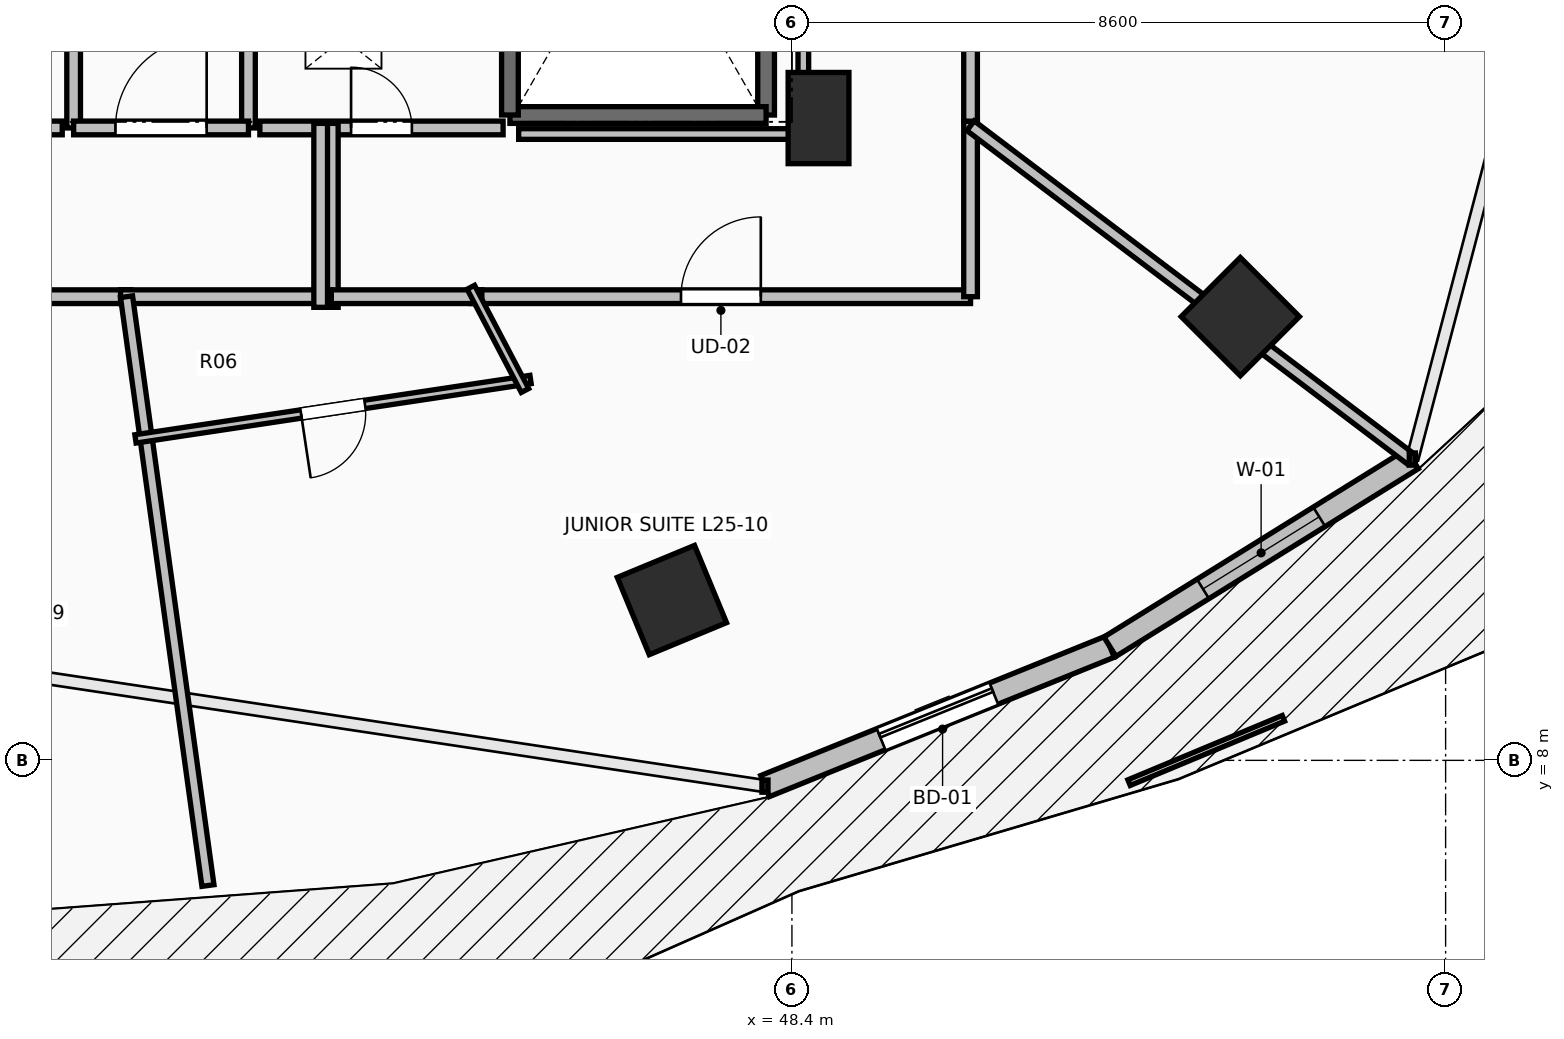
"""IFC4 building model, lengths in metres.
Left out: names, types, materials, properties, quantities, classifications, styles, units other than length and angle.
Written with IfcOpenShell. Run it as: python <this file> out.ifc"""

import sys

from ifc_helpers import new_model, si_unit, direction, frame, frame_2d, origin, origin_2d, place, context, subcontext, project, spatial, rectangle, extrude, element, fill, save


model = new_model("IFC4")
c1 = context("Model", 3, precision=1e-05, world=origin(), true_north=direction((0.0, 1.0)))
c2 = subcontext(c1, "Body", "Model", "MODEL_VIEW")
j1 = project(units=[si_unit("LENGTHUNIT", "METRE"), si_unit("PLANEANGLEUNIT", "RADIAN")], contexts=[c1])
p1 = place(None, origin())
s1 = spatial("IfcSite", under=j1, at=p1, CompositionType="ELEMENT")
p2 = place(p1, origin())
s2 = spatial("IfcBuilding", under=s1, at=p2, CompositionType="ELEMENT")
p3 = place(p2, frame((0.0, 0.0, 96.3)))
s3 = spatial("IfcBuildingStorey", under=s2, at=p3, CompositionType="ELEMENT", Elevation=96.3)
for number, where, z_axis, x_axis in (
    (1, (46.821, 10.109, 0.0), (0.0, 0.0, 1.0), (0.383, -0.924, 0.0)),
    (2, (54.299, 13.838, 0.0), (0.0, 0.0, 1.0), (0.707, -0.707, 0.0)),
):
    element("IfcColumn", number, at=place(p3, frame(where, z_axis=z_axis, x_axis=x_axis)), inside=s3, PredefinedType="COLUMN", context=c2, shape_type="SweptSolid", body=[
        extrude(rectangle(XDim=1.1, YDim=1.1, at=origin_2d()), origin(), (0.0, 0.0, 1.0), 3.5),
    ])
p4 = place(p3, frame((48.75, 16.45, 0.0), z_axis=(0.0, 0.0, 1.0), x_axis=(1.0, 0.0, 0.0)))
e3 = element("IfcColumn", 3, at=p4, inside=s3, PredefinedType="PILASTER", context=c2, shape_type="SweptSolid", body=[
    extrude(rectangle(XDim=0.8, YDim=1.2, at=origin_2d()), origin(), (0.0, 0.0, 1.0), 3.5),
])
p5 = place(p3, frame((48.045, 7.661, 0.0), z_axis=(0.0, 0.0, 1.0), x_axis=(0.927122233109, 0.374759075775, 0.0)))
e4 = element("IfcWall", 4, at=p5, inside=s3, PredefinedType="STANDARD", context=c2, shape_type="SweptSolid", body=[
    extrude(rectangle(XDim=4.895, YDim=0.3, at=frame_2d((2.448, 0.0))), origin(), (0.0, 0.0, 1.0), 3.24),
])
p6 = place(p5, frame((1.647, 0.0, 0.0)))
e5 = element("IfcOpeningElement", 5, at=p6, cuts=e4, PredefinedType="OPENING", context=c2, shape_type="SweptSolid", body=[
    extrude(rectangle(XDim=1.6, YDim=2.3, at=frame_2d((0.8, 1.15))), frame((0.0, 0.165, 0.0), z_axis=(0.0, -1.0, 0.0), x_axis=(1.0, 0.0, 0.0)), (0.0, 0.0, 1.0), 0.33),
])
p7 = place(p3, frame((52.584, 9.495, 0.0), z_axis=(0.0, 0.0, 1.0), x_axis=(0.849684479743, 0.527291461038, 0.0)))
e6 = element("IfcWall", 6, at=p7, inside=s3, PredefinedType="STANDARD", context=c2, shape_type="SweptSolid", body=[
    extrude(rectangle(XDim=4.681, YDim=0.3, at=frame_2d((2.341, 0.0))), origin(), (0.0, 0.0, 1.0), 3.24),
])
p8 = place(p7, frame((1.441, 0.0, 0.85)))
e7 = element("IfcOpeningElement", 7, at=p8, cuts=e6, PredefinedType="OPENING", context=c2, shape_type="SweptSolid", body=[
    extrude(rectangle(XDim=1.8, YDim=2.19, at=frame_2d((0.9, 1.095))), frame((0.0, 0.165, 0.0), z_axis=(0.0, -1.0, 0.0), x_axis=(1.0, 0.0, 0.0)), (0.0, 0.0, 1.0), 0.33),
])
p9 = place(p3, frame((48.06, 23.91, 0.0), z_axis=(0.0, 0.0, 1.0), x_axis=(0.0, -1.0, 0.0)))
e8 = element("IfcWall", 8, at=p9, inside=s3, PredefinedType="SOLIDWALL", context=c2, shape_type="SweptSolid", body=[
    extrude(rectangle(XDim=7.42, YDim=0.22, at=frame_2d((3.71, 0.0))), origin(), (0.0, 0.0, 1.0), 3.24),
])
p10 = place(p3, frame((48.06, 16.49, 0.0), z_axis=(0.0, 0.0, 1.0), x_axis=(-1.0, 0.0, 0.0)))
e9 = element("IfcWall", 9, at=p10, inside=s3, PredefinedType="SOLIDWALL", context=c2, shape_type="SweptSolid", body=[
    extrude(rectangle(XDim=3.37, YDim=0.22, at=frame_2d((1.685, 0.0))), origin(), (0.0, 0.0, 1.0), 3.24),
])
p11 = place(p3, frame((44.69, 16.49, 0.0), z_axis=(0.0, 0.0, 1.0), x_axis=(0.0, 1.0, 0.0)))
e10 = element("IfcWall", 10, at=p11, inside=s3, PredefinedType="SOLIDWALL", context=c2, shape_type="SweptSolid", body=[
    extrude(rectangle(XDim=7.42, YDim=0.22, at=frame_2d((3.71, 0.0))), origin(), (0.0, 0.0, 1.0), 3.24),
])
p12 = place(p3, frame((41.25, 16.32, 0.0), z_axis=(0.0, 0.0, 1.0), x_axis=(0.0, 1.0, 0.0)))
e11 = element("IfcWall", 11, at=p12, inside=s3, PredefinedType="PARTITIONING", context=c2, shape_type="SweptSolid", body=[
    extrude(rectangle(XDim=3.985, YDim=0.18, at=frame_2d((1.992, 0.0))), origin(), (0.0, 0.0, 1.0), 3.24),
])
p13 = place(p12, frame((1.593, 0.0, 0.0)))
e12 = element("IfcOpeningElement", 12, at=p13, cuts=e11, PredefinedType="OPENING", context=c2, shape_type="SweptSolid", body=[
    extrude(rectangle(XDim=0.8, YDim=2.05, at=frame_2d((0.4, 1.025))), frame((0.0, 0.105, 0.0), z_axis=(0.0, -1.0, 0.0), x_axis=(1.0, 0.0, 0.0)), (0.0, 0.0, 1.0), 0.21),
])
p14 = place(p3, frame((38.95, 21.755, 0.0), z_axis=(0.0, 0.0, 1.0), x_axis=(0.0, -1.0, 0.0)))
e13 = element("IfcWall", 13, at=p14, inside=s3, PredefinedType="PARTITIONING", context=c2, shape_type="SweptSolid", body=[
    extrude(rectangle(XDim=5.435, YDim=0.18, at=frame_2d((2.717, 0.0))), origin(), (0.0, 0.0, 1.0), 3.24),
])
p15 = place(p14, frame((2.292, 0.0, 0.0)))
e14 = element("IfcOpeningElement", 14, at=p15, cuts=e13, PredefinedType="OPENING", context=c2, shape_type="SweptSolid", body=[
    extrude(rectangle(XDim=0.85, YDim=2.1, at=frame_2d((0.425, 1.05))), frame((0.0, 0.105, 0.0), z_axis=(0.0, -1.0, 0.0), x_axis=(1.0, 0.0, 0.0)), (0.0, 0.0, 1.0), 0.21),
])
p16 = place(p3, frame((38.95, 16.32, 0.0), z_axis=(0.0, 0.0, 1.0), x_axis=(1.0, 0.0, 0.0)))
e15 = element("IfcWall", 15, at=p16, inside=s3, PredefinedType="PARTITIONING", context=c2, shape_type="SweptSolid", body=[
    extrude(rectangle(XDim=2.3, YDim=0.18, at=frame_2d((1.15, 0.0))), origin(), (0.0, 0.0, 1.0), 3.24),
])
p17 = place(p16, frame((0.55, 0.0, 0.0)))
e16 = element("IfcOpeningElement", 16, at=p17, cuts=e15, PredefinedType="OPENING", context=c2, shape_type="SweptSolid", body=[
    extrude(rectangle(XDim=1.2, YDim=2.15, at=frame_2d((0.6, 1.075))), frame((0.0, 0.105, 0.0), z_axis=(0.0, -1.0, 0.0), x_axis=(1.0, 0.0, 0.0)), (0.0, 0.0, 1.0), 0.21),
])
p18 = place(p3, frame((41.4, 16.32, 0.0), z_axis=(0.0, 0.0, 1.0), x_axis=(1.0, 0.0, 0.0)))
e17 = element("IfcWall", 17, at=p18, inside=s3, PredefinedType="PARTITIONING", context=c2, shape_type="SweptSolid", body=[
    extrude(rectangle(XDim=3.2, YDim=0.18, at=frame_2d((1.6, 0.0))), origin(), (0.0, 0.0, 1.0), 3.24),
])
p19 = place(p18, frame((1.2, 0.0, 0.0)))
e18 = element("IfcOpeningElement", 18, at=p19, cuts=e17, PredefinedType="OPENING", context=c2, shape_type="SweptSolid", body=[
    extrude(rectangle(XDim=0.8, YDim=2.05, at=frame_2d((0.4, 1.025))), frame((0.0, 0.105, 0.0), z_axis=(0.0, -1.0, 0.0), x_axis=(1.0, 0.0, 0.0)), (0.0, 0.0, 1.0), 0.21),
])
p20 = place(p3, frame((31.4, 16.32, 0.0), z_axis=(0.0, 0.0, 1.0), x_axis=(1.0, 0.0, 0.0)))
e19 = element("IfcWall", 19, at=p20, inside=s3, PredefinedType="PARTITIONING", context=c2, shape_type="SweptSolid", body=[
    extrude(rectangle(XDim=7.4, YDim=0.18, at=frame_2d((3.7, 0.0))), origin(), (0.0, 0.0, 1.0), 3.24),
])
p21 = place(p20, frame((3.275, 0.0, 0.0)))
e20 = element("IfcOpeningElement", 20, at=p21, cuts=e19, PredefinedType="OPENING", context=c2, shape_type="SweptSolid", body=[
    extrude(rectangle(XDim=0.85, YDim=2.1, at=frame_2d((0.425, 1.05))), frame((0.0, 0.105, 0.0), z_axis=(0.0, -1.0, 0.0), x_axis=(1.0, 0.0, 0.0)), (0.0, 0.0, 1.0), 0.21),
])
p22 = place(p3, frame((36.068, 14.1, 0.0), z_axis=(0.0, 0.0, 1.0), x_axis=(1.0, 0.0, 0.0)))
e21 = element("IfcWall", 21, at=p22, inside=s3, PredefinedType="PARTITIONING", context=c2, shape_type="SweptSolid", body=[
    extrude(rectangle(XDim=3.639, YDim=0.18, at=frame_2d((1.819, 0.0))), origin(), (0.0, 0.0, 1.0), 2.972),
])
p23 = place(p22, frame((1.32, 0.0, 0.0)))
e22 = element("IfcOpeningElement", 22, at=p23, cuts=e21, PredefinedType="OPENING", context=c2, shape_type="SweptSolid", body=[
    extrude(rectangle(XDim=1.0, YDim=2.15, at=frame_2d((0.5, 1.075))), frame((0.0, 0.105, 0.0), z_axis=(0.0, -1.0, 0.0), x_axis=(1.0, 0.0, 0.0)), (0.0, 0.0, 1.0), 0.21),
])
p24 = place(p3, frame((44.181, 14.1, 0.0), z_axis=(0.0, 0.0, 1.0), x_axis=(1.0, 0.0, 0.0)))
e23 = element("IfcWall", 23, at=p24, inside=s3, PredefinedType="PARTITIONING", context=c2, shape_type="SweptSolid", body=[
    extrude(rectangle(XDim=6.569, YDim=0.18, at=frame_2d((3.285, 0.0))), origin(), (0.0, 0.0, 1.0), 2.432),
])
p25 = place(p24, frame((2.76, 0.0, 0.0)))
e24 = element("IfcOpeningElement", 24, at=p25, cuts=e23, PredefinedType="OPENING", context=c2, shape_type="SweptSolid", body=[
    extrude(rectangle(XDim=1.05, YDim=2.2, at=frame_2d((0.525, 1.1))), frame((0.0, 0.105, 0.0), z_axis=(0.0, -1.0, 0.0), x_axis=(1.0, 0.0, 0.0)), (0.0, 0.0, 1.0), 0.21),
])
p26 = place(p3, frame((50.75, 14.1, 0.0), z_axis=(0.0, 0.0, 1.0), x_axis=(0.0, 1.0, 0.0)))
e25 = element("IfcWall", 25, at=p26, inside=s3, PredefinedType="PARTITIONING", context=c2, shape_type="SweptSolid", body=[
    extrude(rectangle(XDim=2.309, YDim=0.18, at=frame_2d((1.154, 0.0))), origin(), (0.0, 0.0, 1.0), 2.432),
])
p27 = place(p3, frame((42.34, 16.38, 0.0), z_axis=(0.0, 0.0, 1.0), x_axis=(0.0, -1.0, 0.0)))
e26 = element("IfcWall", 26, at=p27, inside=s3, PredefinedType="PARTITIONING", context=c2, shape_type="SweptSolid", body=[
    extrude(rectangle(XDim=2.42, YDim=0.18, at=frame_2d((1.21, 0.0))), origin(), (0.0, 0.0, 1.0), 2.972),
])
p28 = place(p3, frame((42.2, 14.1, 0.0), z_axis=(0.0, 0.0, 1.0), x_axis=(1.0, 0.0, 0.0)))
e27 = element("IfcWall", 27, at=p28, inside=s3, PredefinedType="PARTITIONING", context=c2, shape_type="SweptSolid", body=[
    extrude(rectangle(XDim=2.121, YDim=0.18, at=frame_2d((1.061, 0.0))), origin(), (0.0, 0.0, 1.0), 2.972),
])
p29 = place(p3, frame((39.567, 14.1, 0.0), z_axis=(0.0, 0.0, 1.0), x_axis=(1.0, 0.0, 0.0)))
e28 = element("IfcWall", 28, at=p29, inside=s3, PredefinedType="PARTITIONING", context=c2, shape_type="SweptSolid", body=[
    extrude(rectangle(XDim=2.773, YDim=0.18, at=frame_2d((1.387, 0.0))), origin(), (0.0, 0.0, 1.0), 2.972),
])
p30 = place(p3, frame((42.2, 13.96, 0.0), z_axis=(0.0, 0.0, 1.0), x_axis=(0.0, 1.0, 0.0)))
e29 = element("IfcWall", 29, at=p30, inside=s3, PredefinedType="PARTITIONING", context=c2, shape_type="SweptSolid", body=[
    extrude(rectangle(XDim=2.42, YDim=0.18, at=frame_2d((1.21, 0.0))), origin(), (0.0, 0.0, 1.0), 2.972),
])
p31 = place(p3, frame((50.75, 16.409, 0.0), z_axis=(0.0, 0.0, 1.0), x_axis=(0.0, 1.0, 0.0)))
e30 = element("IfcWall", 30, at=p31, inside=s3, PredefinedType="PARTITIONING", context=c2, shape_type="SweptSolid", body=[
    extrude(rectangle(XDim=11.155, YDim=0.18, at=frame_2d((5.578, 0.0))), origin(), (0.0, 0.0, 1.0), 2.432),
])
p32 = place(p31, frame((5.077, 0.0, 0.0)))
e31 = element("IfcOpeningElement", 31, at=p32, cuts=e30, PredefinedType="OPENING", context=c2, shape_type="SweptSolid", body=[
    extrude(rectangle(XDim=1.0, YDim=2.15, at=frame_2d((0.5, 1.075))), frame((0.0, 0.105, 0.0), z_axis=(0.0, -1.0, 0.0), x_axis=(1.0, 0.0, 0.0)), (0.0, 0.0, 1.0), 0.21),
])
p33 = place(p3, frame((40.717, 6.353, 0.0), z_axis=(0.0, 0.0, 1.0), x_axis=(-0.136949014068, 0.990578097651, 0.0)))
e32 = element("IfcWall", 32, at=p33, inside=s3, PredefinedType="PARTITIONING", context=c2, shape_type="SweptSolid", body=[
    extrude(rectangle(XDim=7.821, YDim=0.16, at=frame_2d((3.91, 0.0))), origin(), (0.0, 0.0, 1.0), 2.432),
])
p34 = place(p3, frame((44.961, 13.011, 0.0), z_axis=(0.0, 0.0, 1.0), x_axis=(-0.98888518965, -0.148681141008, 0.0)))
e33 = element("IfcWall", 33, at=p34, inside=s3, PredefinedType="PARTITIONING", context=c2, shape_type="SweptSolid", body=[
    extrude(rectangle(XDim=5.256, YDim=0.11, at=frame_2d((2.628, 0.0))), origin(), (0.0, 0.0, 1.0), 2.432),
])
p35 = place(p34, frame((2.203, 0.0, 0.0)))
e34 = element("IfcOpeningElement", 34, at=p35, cuts=e33, PredefinedType="OPENING", context=c2, shape_type="SweptSolid", body=[
    extrude(rectangle(XDim=0.85, YDim=2.1, at=frame_2d((0.425, 1.05))), frame((0.0, 0.07, 0.0), z_axis=(0.0, -1.0, 0.0), x_axis=(1.0, 0.0, 0.0)), (0.0, 0.0, 1.0), 0.14),
])
p36 = place(p3, frame((44.176, 14.224, 0.0), z_axis=(0.0, 0.0, 1.0), x_axis=(0.464262791375, -0.885697499457, 0.0)))
e35 = element("IfcWall", 35, at=p36, inside=s3, PredefinedType="PARTITIONING", context=c2, shape_type="SweptSolid", body=[
    extrude(rectangle(XDim=1.533, YDim=0.11, at=frame_2d((0.767, 0.0))), origin(), (0.0, 0.0, 1.0), 2.432),
])
p37 = place(p3, frame((56.548, 11.96, 0.0), z_axis=(0.0, 0.0, 1.0), x_axis=(-0.797312940684, 0.603566131105, 0.0)))
e36 = element("IfcWall", 36, at=p37, inside=s3, PredefinedType="PARTITIONING", context=c2, shape_type="SweptSolid", body=[
    extrude(rectangle(XDim=7.272, YDim=0.16, at=frame_2d((3.636, 0.0))), origin(), (0.0, 0.0, 1.0), 2.432),
])
p38 = place(p3, frame((48.55, 23.754, 0.0), z_axis=(0.0, 0.0, 1.0), x_axis=(0.0, -1.0, 0.0)))
e37 = element("IfcWall", 37, at=p38, inside=s3, PredefinedType="PARTITIONING", context=c2, shape_type="SweptSolid", body=[
    extrude(rectangle(XDim=7.514, YDim=0.14, at=frame_2d((3.757, 0.0))), origin(), (0.0, 0.0, 1.0), 2.432),
])
p39 = place(p3, frame((48.55, 16.24, 0.0), z_axis=(0.0, 0.0, 1.0), x_axis=(-1.0, 0.0, 0.0)))
e38 = element("IfcWall", 38, at=p39, inside=s3, PredefinedType="PARTITIONING", context=c2, shape_type="SweptSolid", body=[
    extrude(rectangle(XDim=3.745, YDim=0.14, at=frame_2d((1.873, 0.0))), origin(), (0.0, 0.0, 1.0), 2.432),
])
p40 = place(p6, origin())
e39 = element("IfcDoor", 39, at=p40, inside=s3, OperationType="SLIDING_TO_LEFT", PredefinedType="DOOR", context=c2, shape_type="SweptSolid", body=[
    extrude(rectangle(XDim=1.6, YDim=2.3, at=frame_2d((0.8, 1.15))), frame((0.0, 0.025, 0.0), z_axis=(0.0, -1.0, 0.0), x_axis=(1.0, 0.0, 0.0)), (0.0, 0.0, 1.0), 0.05),
])
fill(e5, e39)
p41 = place(p8, origin())
e40 = element("IfcWindow", 40, at=p41, inside=s3, PartitioningType="SINGLE_PANEL", PredefinedType="WINDOW", context=c2, shape_type="SweptSolid", body=[
    extrude(rectangle(XDim=1.8, YDim=2.19, at=frame_2d((0.9, 1.095))), frame((0.0, 0.03, 0.0), z_axis=(0.0, -1.0, 0.0), x_axis=(1.0, 0.0, 0.0)), (0.0, 0.0, 1.0), 0.06),
])
fill(e7, e40)
p42 = place(p17, origin())
e41 = element("IfcDoor", 41, at=p42, inside=s3, OperationType="SINGLE_SWING_RIGHT", PredefinedType="DOOR", context=c2, shape_type="SweptSolid", body=[
    extrude(rectangle(XDim=1.2, YDim=2.15, at=frame_2d((0.6, 1.075))), frame((0.0, 0.025, 0.0), z_axis=(0.0, -1.0, 0.0), x_axis=(1.0, 0.0, 0.0)), (0.0, 0.0, 1.0), 0.05),
])
fill(e16, e41)
p43 = place(p19, origin())
e42 = element("IfcDoor", 42, at=p43, inside=s3, OperationType="SINGLE_SWING_LEFT", PredefinedType="DOOR", context=c2, shape_type="SweptSolid", body=[
    extrude(rectangle(XDim=0.8, YDim=2.05, at=frame_2d((0.4, 1.025))), frame((0.0, 0.025, 0.0), z_axis=(0.0, -1.0, 0.0), x_axis=(1.0, 0.0, 0.0)), (0.0, 0.0, 1.0), 0.05),
])
fill(e18, e42)
p44 = place(p25, origin())
e43 = element("IfcDoor", 43, at=p44, inside=s3, OperationType="SINGLE_SWING_RIGHT", PredefinedType="DOOR", context=c2, shape_type="SweptSolid", body=[
    extrude(rectangle(XDim=1.05, YDim=2.2, at=frame_2d((0.525, 1.1))), frame((0.0, 0.025, 0.0), z_axis=(0.0, -1.0, 0.0), x_axis=(1.0, 0.0, 0.0)), (0.0, 0.0, 1.0), 0.05),
])
fill(e24, e43)
p45 = place(p35, origin())
e44 = element("IfcDoor", 44, at=p45, inside=s3, OperationType="SINGLE_SWING_RIGHT", PredefinedType="DOOR", context=c2, shape_type="SweptSolid", body=[
    extrude(rectangle(XDim=0.85, YDim=2.1, at=frame_2d((0.425, 1.05))), frame((0.0, 0.025, 0.0), z_axis=(0.0, -1.0, 0.0), x_axis=(1.0, 0.0, 0.0)), (0.0, 0.0, 1.0), 0.05),
])
fill(e34, e44)
save(model, sys.argv[1])
